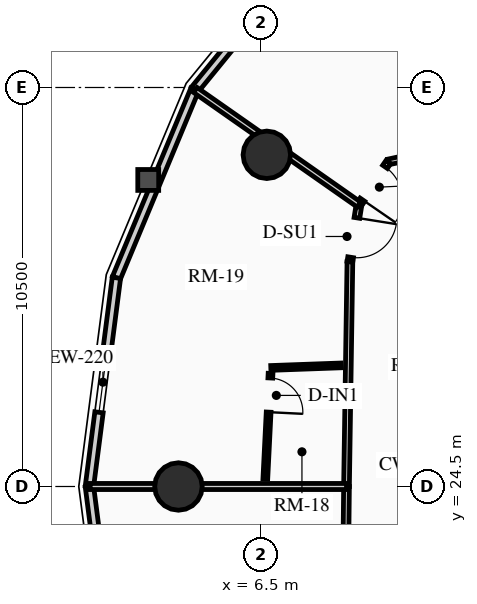
"""IFC4 building model, lengths in metres.
Left out: names, types, materials, properties, quantities, classifications, styles, units other than length and angle.
Written with IfcOpenShell. Run it as: python <this file> out.ifc"""

import sys

from ifc_helpers import new_model, si_unit, direction, frame, frame_2d, origin, origin_2d, place, context, subcontext, project, spatial, rectangle, circle, extrude, source, transform, mapped, element, fill, save


model = new_model("IFC4")
c1 = context("Model", 3, precision=1e-05, world=origin(), true_north=direction((0.0, 1.0)))
c2 = subcontext(c1, "Body", "Model", "MODEL_VIEW")
j1 = project(units=[si_unit("LENGTHUNIT", "METRE"), si_unit("PLANEANGLEUNIT", "RADIAN")], contexts=[c1])
p1 = place(None, origin())
s1 = spatial("IfcSite", under=j1, at=p1, CompositionType="ELEMENT")
p2 = place(p1, origin())
s2 = spatial("IfcBuilding", under=s1, at=p2, CompositionType="ELEMENT")
p3 = place(p2, frame((0.0, 0.0, 154.51)))
s3 = spatial("IfcBuildingStorey", under=s2, at=p3, CompositionType="ELEMENT", Elevation=154.51)
for number, where, z_axis, x_axis in (
    (1, (6.653, 33.229, 0.0), (0.0, 0.0, 1.0), (1.0, 0.0, 0.0)),
    (2, (4.328, 24.5, 0.0), (0.0, 0.0, 1.0), (1.0, 0.0, 0.0)),
):
    element("IfcColumn", number, at=place(p3, frame(where, z_axis=z_axis, x_axis=x_axis)), inside=s3, PredefinedType="USERDEFINED", context=c2, shape_type="SweptSolid", body=[
        extrude(circle(Radius=0.625, at=origin_2d()), origin(), (0.0, 0.0, 1.0), 2.91),
    ])
p4 = place(p3, frame((4.757, 34.945, 0.0), z_axis=(0.0, 0.0, 1.0), x_axis=(0.632598524901, 0.774479894053, 0.0)))
e3 = element("IfcWall", 3, at=p4, inside=s3, PredefinedType="SOLIDWALL", context=c2, shape_type="SweptSolid", body=[
    extrude(rectangle(XDim=5.076, YDim=0.22, at=frame_2d((2.538, 0.0))), origin(), (0.0, 0.0, 1.0), 2.245),
])
m1 = source(origin(), c2, "Body", "SweptSolid", [
    extrude(rectangle(XDim=1.6, YDim=1.3, at=frame_2d((0.8, 0.65))), frame((0.0, 0.12, 0.0), z_axis=(0.0, -1.0, 0.0), x_axis=(1.0, 0.0, 0.0)), (0.0, 0.0, 1.0), 0.24),
])
p5 = place(p4, frame((1.738, 0.0, 0.65)))
e4 = element("IfcOpeningElement", 4, at=p5, cuts=e3, PredefinedType="OPENING", context=c2, shape_type="MappedRepresentation", body=[
    mapped(m1, transform((0.0, 0.0, 0.0), x_axis=(1.0, 0.0, 0.0), y_axis=(0.0, 1.0, 0.0), z_axis=(0.0, 0.0, 1.0), scale=1.0)),
])
p6 = place(p3, frame((2.695, 29.991, 0.0), z_axis=(0.0, 0.0, 1.0), x_axis=(0.384259959969, 0.923224936386, 0.0)))
e5 = element("IfcWall", 5, at=p6, inside=s3, PredefinedType="SOLIDWALL", context=c2, shape_type="SweptSolid", body=[
    extrude(rectangle(XDim=5.365, YDim=0.22, at=frame_2d((2.683, 0.0))), origin(), (0.0, 0.0, 1.0), 2.245),
])
p7 = place(p3, frame((1.985, 24.5, 0.0), z_axis=(0.0, 0.0, 1.0), x_axis=(0.128266533912, 0.991739732126, 0.0)))
e6 = element("IfcWall", 6, at=p7, inside=s3, PredefinedType="SOLIDWALL", context=c2, shape_type="SweptSolid", body=[
    extrude(rectangle(XDim=5.537, YDim=0.22, at=frame_2d((2.769, 0.0))), origin(), (0.0, 0.0, 1.0), 2.245),
])
p8 = place(p7, frame((1.968, 0.0, 0.65)))
e7 = element("IfcOpeningElement", 7, at=p8, cuts=e6, PredefinedType="OPENING", context=c2, shape_type="MappedRepresentation", body=[
    mapped(m1, transform((0.0, 0.0, 0.0), x_axis=(1.0, 0.0, 0.0), y_axis=(0.0, 1.0, 0.0), z_axis=(0.0, 0.0, 1.0), scale=1.0)),
])
p9 = place(p3, frame((2.695, 19.009, 0.0), z_axis=(0.0, 0.0, 1.0), x_axis=(-0.128266533912, 0.991739732126, 0.0)))
e8 = element("IfcWall", 8, at=p9, inside=s3, PredefinedType="SOLIDWALL", context=c2, shape_type="SweptSolid", body=[
    extrude(rectangle(XDim=5.537, YDim=0.22, at=frame_2d((2.769, 0.0))), origin(), (0.0, 0.0, 1.0), 2.245),
])
p10 = place(p3, frame((11.712, 33.44, 0.0), z_axis=(0.0, 0.0, 1.0), x_axis=(-0.977753514213, -0.209757158265, 0.0)))
e9 = element("IfcWall", 9, at=p10, inside=s3, PredefinedType="PARTITIONING", context=c2, shape_type="SweptSolid", body=[
    extrude(rectangle(XDim=1.901, YDim=0.15, at=frame_2d((0.95, 0.0))), origin(), (0.0, 0.0, 1.0), 2.245),
])
p11 = place(p3, frame((9.853, 33.042, 0.0), z_axis=(0.0, 0.0, 1.0), x_axis=(-0.567189283521, -0.823587467522, 0.0)))
e10 = element("IfcWall", 10, at=p11, inside=s3, PredefinedType="PARTITIONING", context=c2, shape_type="SweptSolid", body=[
    extrude(rectangle(XDim=1.365, YDim=0.15, at=frame_2d((0.682, 0.0))), origin(), (0.0, 0.0, 1.0), 2.245),
])
m2 = source(origin(), c2, "Body", "SweptSolid", [
    extrude(rectangle(XDim=1.05, YDim=2.015, at=frame_2d((0.525, 1.007))), frame((0.0, 0.085, 0.0), z_axis=(0.0, -1.0, 0.0), x_axis=(1.0, 0.0, 0.0)), (0.0, 0.0, 1.0), 0.17),
])
p12 = place(p11, frame((0.157, 0.0, 0.0)))
e11 = element("IfcOpeningElement", 11, at=p12, cuts=e10, PredefinedType="OPENING", context=c2, shape_type="MappedRepresentation", body=[
    mapped(m2, transform((0.0, 0.0, 0.0), x_axis=(1.0, 0.0, 0.0), y_axis=(0.0, 1.0, 0.0), z_axis=(0.0, 0.0, 1.0), scale=1.0)),
])
p13 = place(p3, frame((9.079, 31.918, 0.0), z_axis=(0.0, 0.0, 1.0), x_axis=(-0.15742775293, -0.987530507178, 0.0)))
e12 = element("IfcWall", 12, at=p13, inside=s3, PredefinedType="PARTITIONING", context=c2, shape_type="SweptSolid", body=[
    extrude(rectangle(XDim=1.523, YDim=0.15, at=frame_2d((0.761, 0.0))), origin(), (0.0, 0.0, 1.0), 2.245),
])
p14 = place(p13, frame((0.353, 0.0, 0.0)))
e13 = element("IfcOpeningElement", 13, at=p14, cuts=e12, PredefinedType="OPENING", context=c2, shape_type="MappedRepresentation", body=[
    mapped(m2, transform((0.0, 0.0, 0.0), x_axis=(1.0, 0.0, 0.0), y_axis=(0.0, 1.0, 0.0), z_axis=(0.0, 0.0, 1.0), scale=1.0)),
])
p15 = place(p3, frame((8.84, 30.414, 0.0), z_axis=(0.0, 0.0, 1.0), x_axis=(-0.01514915101, -0.999885245027, 0.0)))
e14 = element("IfcWall", 14, at=p15, inside=s3, PredefinedType="PARTITIONING", context=c2, shape_type="SweptSolid", body=[
    extrude(rectangle(XDim=5.915, YDim=0.15, at=frame_2d((2.957, 0.0))), origin(), (0.0, 0.0, 1.0), 2.675),
])
p16 = place(p3, frame((8.75, 24.5, 0.0), z_axis=(0.0, 0.0, 1.0), x_axis=(-0.01076642715, -0.999942040344, 0.0)))
e15 = element("IfcWall", 15, at=p16, inside=s3, PredefinedType="PARTITIONING", context=c2, shape_type="SweptSolid", body=[
    extrude(rectangle(XDim=6.032, YDim=0.15, at=frame_2d((3.016, 0.0))), origin(), (0.0, 0.0, 1.0), 2.245),
])
p17 = place(p3, frame((9.079, 31.918, 0.0), z_axis=(0.0, 0.0, 1.0), x_axis=(-0.819135909075, 0.573599479135, 0.0)))
e16 = element("IfcWall", 16, at=p17, inside=s3, PredefinedType="PARTITIONING", context=c2, shape_type="SweptSolid", body=[
    extrude(rectangle(XDim=5.257, YDim=0.16, at=frame_2d((2.628, 0.0))), origin(), (0.0, 0.0, 1.0), 2.245),
])
p18 = place(p3, frame((8.75, 24.5, 0.0), z_axis=(0.0, 0.0, 1.0), x_axis=(-1.0, 0.0, 0.0)))
e17 = element("IfcWall", 17, at=p18, inside=s3, PredefinedType="PARTITIONING", context=c2, shape_type="SweptSolid", body=[
    extrude(rectangle(XDim=6.745, YDim=0.16, at=frame_2d((3.373, 0.0))), origin(), (0.0, 0.0, 1.0), 2.245),
])
p19 = place(p3, frame((8.606, 27.687, 0.0), z_axis=(0.0, 0.0, 1.0), x_axis=(-0.999349834195, -0.036054249337, 0.0)))
e18 = element("IfcWall", 18, at=p19, inside=s3, PredefinedType="PARTITIONING", context=c2, shape_type="SweptSolid", body=[
    extrude(rectangle(XDim=1.849, YDim=0.125, at=frame_2d((0.924, 0.0))), origin(), (0.0, 0.0, 1.0), 2.675),
])
p20 = place(p3, frame((6.751, 27.475, 0.0), z_axis=(0.0, 0.0, 1.0), x_axis=(-0.049591166042, -0.998769601185, 0.0)))
e19 = element("IfcWall", 19, at=p20, inside=s3, PredefinedType="PARTITIONING", context=c2, shape_type="SweptSolid", body=[
    extrude(rectangle(XDim=2.777, YDim=0.125, at=frame_2d((1.388, 0.0))), origin(), (0.0, 0.0, 1.0), 2.675),
])
m3 = source(origin(), c2, "Body", "SweptSolid", [
    extrude(rectangle(XDim=0.9, YDim=2.005, at=frame_2d((0.45, 1.002))), frame((0.0, 0.073, 0.0), z_axis=(0.0, -1.0, 0.0), x_axis=(1.0, 0.0, 0.0)), (0.0, 0.0, 1.0), 0.145),
])
p21 = place(p20, frame((0.12, 0.0, 0.0)))
e20 = element("IfcOpeningElement", 20, at=p21, cuts=e19, PredefinedType="OPENING", context=c2, shape_type="MappedRepresentation", body=[
    mapped(m3, transform((0.0, 0.0, 0.0), x_axis=(1.0, 0.0, 0.0), y_axis=(0.0, 1.0, 0.0), z_axis=(0.0, 0.0, 1.0), scale=1.0)),
])
m4 = source(origin(), c2, "Body", "SweptSolid", [
    extrude(rectangle(XDim=1.6, YDim=1.3, at=frame_2d((0.8, 0.65))), frame((0.0, 0.03, 0.0), z_axis=(0.0, -1.0, 0.0), x_axis=(1.0, 0.0, 0.0)), (0.0, 0.0, 1.0), 0.06),
])
p22 = place(p8, origin())
e21 = element("IfcWindow", 21, at=p22, inside=s3, PartitioningType="SINGLE_PANEL", PredefinedType="WINDOW", context=c2, shape_type="MappedRepresentation", body=[
    mapped(m4, transform((0.0, 0.0, 0.0), x_axis=(1.0, 0.0, 0.0), y_axis=(0.0, 1.0, 0.0), z_axis=(0.0, 0.0, 1.0), scale=1.0)),
])
fill(e7, e21)
m5 = source(origin(), c2, "Body", "SweptSolid", [
    extrude(rectangle(XDim=1.05, YDim=2.015, at=frame_2d((0.525, 1.007))), frame((0.0, 0.025, 0.0), z_axis=(0.0, -1.0, 0.0), x_axis=(1.0, 0.0, 0.0)), (0.0, 0.0, 1.0), 0.05),
])
p23 = place(p12, origin())
e22 = element("IfcDoor", 22, at=p23, inside=s3, OperationType="SINGLE_SWING_RIGHT", PredefinedType="DOOR", context=c2, shape_type="MappedRepresentation", body=[
    mapped(m5, transform((0.0, 0.0, 0.0), x_axis=(1.0, 0.0, 0.0), y_axis=(0.0, 1.0, 0.0), z_axis=(0.0, 0.0, 1.0), scale=1.0)),
])
fill(e11, e22)
p24 = place(p14, origin())
e23 = element("IfcDoor", 23, at=p24, inside=s3, OperationType="SINGLE_SWING_LEFT", PredefinedType="DOOR", context=c2, shape_type="MappedRepresentation", body=[
    mapped(m5, transform((0.0, 0.0, 0.0), x_axis=(1.0, 0.0, 0.0), y_axis=(0.0, 1.0, 0.0), z_axis=(0.0, 0.0, 1.0), scale=1.0)),
])
fill(e13, e23)
m6 = source(origin(), c2, "Body", "SweptSolid", [
    extrude(rectangle(XDim=0.9, YDim=2.005, at=frame_2d((0.45, 1.002))), frame((0.0, 0.025, 0.0), z_axis=(0.0, -1.0, 0.0), x_axis=(1.0, 0.0, 0.0)), (0.0, 0.0, 1.0), 0.05),
])
p25 = place(p21, origin())
e24 = element("IfcDoor", 24, at=p25, inside=s3, OperationType="SINGLE_SWING_RIGHT", PredefinedType="DOOR", context=c2, shape_type="MappedRepresentation", body=[
    mapped(m6, transform((0.0, 0.0, 0.0), x_axis=(1.0, 0.0, 0.0), y_axis=(0.0, 1.0, 0.0), z_axis=(0.0, 0.0, 1.0), scale=1.0)),
])
fill(e20, e24)
save(model, sys.argv[1])
